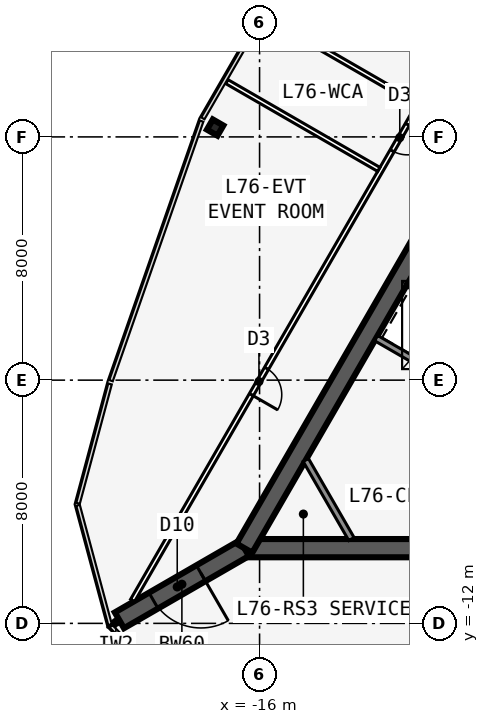
"""IFC4 building model, lengths in metres.
Left out: names, types, materials, properties, quantities, classifications, styles, units other than length and angle.
Written with IfcOpenShell. Run it as: python <this file> out.ifc"""

import sys

from ifc_helpers import new_model, si_unit, direction, frame, frame_2d, origin, origin_2d, place, context, subcontext, project, spatial, rectangle, i_section, extrude, element, fill, save


model = new_model("IFC4")
c1 = context("Model", 3, precision=1e-05, world=origin(), true_north=direction((0.0, 1.0)))
c2 = subcontext(c1, "Body", "Model", "MODEL_VIEW")
j1 = project(units=[si_unit("LENGTHUNIT", "METRE"), si_unit("PLANEANGLEUNIT", "RADIAN")], contexts=[c1])
p1 = place(None, origin())
s1 = spatial("IfcSite", under=j1, at=p1, CompositionType="ELEMENT")
p2 = place(p1, origin())
s2 = spatial("IfcBuilding", under=s1, at=p2, CompositionType="ELEMENT")
p3 = place(p2, frame((0.0, 0.0, 292.8)))
s3 = spatial("IfcBuildingStorey", under=s2, at=p3, CompositionType="ELEMENT", Elevation=292.8)
p4 = place(p3, frame((-16.5, -9.526, 0.0), z_axis=(0.0, 0.0, 1.0), x_axis=(1.0, 0.0, 0.0)))
e1 = element("IfcWall", 1, at=p4, inside=s3, PredefinedType="SHEAR", context=c2, shape_type="SweptSolid", body=[
    extrude(rectangle(XDim=33.0, YDim=0.6, at=frame_2d((16.5, 0.0))), origin(), (0.0, 0.0, 1.0), 5.0),
])
p5 = place(p4, frame((14.05, 0.0, 0.0)))
e2 = element("IfcOpeningElement", 2, at=p5, cuts=e1, PredefinedType="OPENING", context=c2, shape_type="SweptSolid", body=[
    extrude(rectangle(XDim=1.8, YDim=2.13, at=frame_2d((0.9, 1.065))), frame((0.0, 0.31, 0.0), z_axis=(0.0, -1.0, 0.0), x_axis=(1.0, 0.0, 0.0)), (0.0, 0.0, 1.0), 0.62),
])
p6 = place(p3, frame((0.0, 19.052, 0.0), z_axis=(0.0, 0.0, 1.0), x_axis=(-0.499999749417, -0.866025548458, 0.0)))
e3 = element("IfcWall", 3, at=p6, inside=s3, PredefinedType="SHEAR", context=c2, shape_type="SweptSolid", body=[
    extrude(rectangle(XDim=33.0, YDim=0.6, at=frame_2d((16.5, 0.0))), origin(), (0.0, 0.0, 1.0), 5.0),
])
p7 = place(p6, frame((14.15, 0.0, 0.0)))
e4 = element("IfcOpeningElement", 4, at=p7, cuts=e3, PredefinedType="OPENING", context=c2, shape_type="SweptSolid", body=[
    extrude(rectangle(XDim=1.8, YDim=2.13, at=frame_2d((0.9, 1.065))), frame((0.0, 0.31, 0.0), z_axis=(0.0, -1.0, 0.0), x_axis=(1.0, 0.0, 0.0)), (0.0, 0.0, 1.0), 0.62),
])
p8 = place(p6, frame((12.6, 0.0, 0.0)))
e5 = element("IfcOpeningElement", 5, at=p8, cuts=e3, PredefinedType="OPENING", context=c2, shape_type="SweptSolid", body=[
    extrude(rectangle(XDim=1.0, YDim=2.13, at=frame_2d((0.5, 1.065))), frame((0.0, 0.31, 0.0), z_axis=(0.0, -1.0, 0.0), x_axis=(1.0, 0.0, 0.0)), (0.0, 0.0, 1.0), 0.62),
])
p9 = place(p3, frame((-9.329, -4.256, 0.0), z_axis=(0.0, 0.0, 1.0), x_axis=(-0.866027924134, 0.499995634601, 0.0)))
e6 = element("IfcWall", 6, at=p9, inside=s3, PredefinedType="SOLIDWALL", context=c2, shape_type="SweptSolid", body=[
    extrude(rectangle(XDim=3.275, YDim=0.2, at=frame_2d((1.637, 0.0))), origin(), (0.0, 0.0, 1.0), 4.75),
])
p10 = place(p3, frame((-16.5, -9.526, 0.0), z_axis=(0.0, 0.0, 1.0), x_axis=(-0.866031398331, -0.499989616998, 0.0)))
e7 = element("IfcWall", 7, at=p10, inside=s3, PredefinedType="SHEAR", context=c2, shape_type="SweptSolid", body=[
    extrude(rectangle(XDim=4.746, YDim=0.6, at=frame_2d((2.373, 0.0))), origin(), (0.0, 0.0, 1.0), 5.0),
])
p11 = place(p10, frame((1.65, 0.0, 0.0)))
e8 = element("IfcOpeningElement", 8, at=p11, cuts=e7, PredefinedType="OPENING", context=c2, shape_type="SweptSolid", body=[
    extrude(rectangle(XDim=1.8, YDim=2.13, at=frame_2d((0.9, 1.065))), frame((0.0, 0.31, 0.0), z_axis=(0.0, -1.0, 0.0), x_axis=(1.0, 0.0, 0.0)), (0.0, 0.0, 1.0), 0.62),
])
p12 = place(p3, frame((-17.461, 4.308, 0.0), z_axis=(0.0, 0.0, 1.0), x_axis=(-0.866025403784, 0.5, 0.0)))
e9 = element("IfcColumn", 9, at=p12, inside=s3, PredefinedType="COLUMN", context=c2, shape_type="SweptSolid", body=[
    extrude(i_section(OverallWidth=0.399, OverallDepth=0.386, WebThickness=0.021, FlangeThickness=0.033, at=origin_2d()), origin(), (0.0, 0.0, 1.0), 5.0),
])
p13 = place(p3, frame((-0.35, 23.096, 0.0), z_axis=(0.0, 0.0, 1.0), x_axis=(-0.499998875317, -0.866026053119, 0.0)))
e10 = element("IfcWall", 10, at=p13, inside=s3, PredefinedType="PARTITIONING", context=c2, shape_type="SweptSolid", body=[
    extrude(rectangle(XDim=39.654, YDim=0.15, at=frame_2d((19.827, 0.0))), origin(), (0.0, 0.0, 1.0), 4.75),
])
p14 = place(p13, frame((6.664, 0.0, 0.0)))
e11 = element("IfcOpeningElement", 11, at=p14, cuts=e10, PredefinedType="OPENING", context=c2, shape_type="SweptSolid", body=[
    extrude(rectangle(XDim=1.8, YDim=2.13, at=frame_2d((0.9, 1.065))), frame((0.0, 0.085, 0.0), z_axis=(0.0, -1.0, 0.0), x_axis=(1.0, 0.0, 0.0)), (0.0, 0.0, 1.0), 0.17),
])
p15 = place(p13, frame((15.827, 0.0, 0.0)))
e12 = element("IfcOpeningElement", 12, at=p15, cuts=e10, PredefinedType="OPENING", context=c2, shape_type="SweptSolid", body=[
    extrude(rectangle(XDim=1.0, YDim=2.13, at=frame_2d((0.5, 1.065))), frame((0.0, 0.085, 0.0), z_axis=(0.0, -1.0, 0.0), x_axis=(1.0, 0.0, 0.0)), (0.0, 0.0, 1.0), 0.17),
])
p16 = place(p13, frame((18.827, 0.0, 0.0)))
e13 = element("IfcOpeningElement", 13, at=p16, cuts=e10, PredefinedType="OPENING", context=c2, shape_type="SweptSolid", body=[
    extrude(rectangle(XDim=1.0, YDim=2.13, at=frame_2d((0.5, 1.065))), frame((0.0, 0.085, 0.0), z_axis=(0.0, -1.0, 0.0), x_axis=(1.0, 0.0, 0.0)), (0.0, 0.0, 1.0), 0.17),
])
p17 = place(p13, frame((21.577, 0.0, 0.0)))
e14 = element("IfcOpeningElement", 14, at=p17, cuts=e10, PredefinedType="OPENING", context=c2, shape_type="SweptSolid", body=[
    extrude(rectangle(XDim=1.0, YDim=2.13, at=frame_2d((0.5, 1.065))), frame((0.0, 0.085, 0.0), z_axis=(0.0, -1.0, 0.0), x_axis=(1.0, 0.0, 0.0)), (0.0, 0.0, 1.0), 0.17),
])
p18 = place(p13, frame((30.841, 0.0, 0.0)))
e15 = element("IfcOpeningElement", 15, at=p18, cuts=e10, PredefinedType="OPENING", context=c2, shape_type="SweptSolid", body=[
    extrude(rectangle(XDim=1.0, YDim=2.13, at=frame_2d((0.5, 1.065))), frame((0.0, 0.085, 0.0), z_axis=(0.0, -1.0, 0.0), x_axis=(1.0, 0.0, 0.0)), (0.0, 0.0, 1.0), 0.17),
])
for number, where, z_axis, x_axis in (
    (16, (-10.829, 5.097, 0.0), (0.0, 0.0, 1.0), (-0.866, 0.5, 0.0)),
    (17, (-12.079, 2.932, 0.0), (0.0, 0.0, 1.0), (-0.866, 0.5, 0.0)),
):
    element("IfcWall", number, at=place(p3, frame(where, z_axis=z_axis, x_axis=x_axis)), inside=s3, PredefinedType="PARTITIONING", context=c2, shape_type="SweptSolid", body=[
        extrude(rectangle(XDim=5.769, YDim=0.15, at=frame_2d((2.885, 0.0))), origin(), (0.0, 0.0, 1.0), 4.75),
    ])
p19 = place(p3, frame((-20.61, -11.899, 0.0), z_axis=(0.0, 0.0, 1.0), x_axis=(-0.866065156741, -0.499931139538, 0.0)))
e18 = element("IfcWall", 18, at=p19, inside=s3, PredefinedType="PARTITIONING", context=c2, shape_type="SweptSolid", body=[
    extrude(rectangle(XDim=0.27, YDim=0.15, at=frame_2d((0.135, 0.0))), origin(), (0.0, 0.0, 1.0), 4.75),
])
p20 = place(p3, frame((-12.978, -9.226, 0.0), z_axis=(0.0, 0.0, 1.0), x_axis=(-0.499952404951, 0.866052881055, 0.0)))
e19 = element("IfcWall", 19, at=p20, inside=s3, PredefinedType="SOLIDWALL", context=c2, shape_type="SweptSolid", body=[
    extrude(rectangle(XDim=3.002, YDim=0.2, at=frame_2d((1.501, 0.0))), origin(), (0.0, 0.0, 1.0), 4.75),
])
p21 = place(p17, origin())
e20 = element("IfcDoor", 20, at=p21, inside=s3, OperationType="SINGLE_SWING_LEFT", PredefinedType="DOOR", context=c2, shape_type="SweptSolid", body=[
    extrude(rectangle(XDim=1.0, YDim=2.13, at=frame_2d((0.5, 1.065))), frame((0.0, 0.025, 0.0), z_axis=(0.0, -1.0, 0.0), x_axis=(1.0, 0.0, 0.0)), (0.0, 0.0, 1.0), 0.05),
])
fill(e14, e20)
p22 = place(p18, origin())
e21 = element("IfcDoor", 21, at=p22, inside=s3, OperationType="SINGLE_SWING_RIGHT", PredefinedType="DOOR", context=c2, shape_type="SweptSolid", body=[
    extrude(rectangle(XDim=1.0, YDim=2.13, at=frame_2d((0.5, 1.065))), frame((0.0, 0.025, 0.0), z_axis=(0.0, -1.0, 0.0), x_axis=(1.0, 0.0, 0.0)), (0.0, 0.0, 1.0), 0.05),
])
fill(e15, e21)
p23 = place(p11, origin())
e22 = element("IfcDoor", 22, at=p23, inside=s3, OperationType="DOUBLE_DOOR_DOUBLE_SWING", PredefinedType="DOOR", context=c2, shape_type="SweptSolid", body=[
    extrude(rectangle(XDim=1.8, YDim=2.13, at=frame_2d((0.9, 1.065))), frame((0.0, 0.025, 0.0), z_axis=(0.0, -1.0, 0.0), x_axis=(1.0, 0.0, 0.0)), (0.0, 0.0, 1.0), 0.05),
])
fill(e8, e22)
save(model, sys.argv[1])
